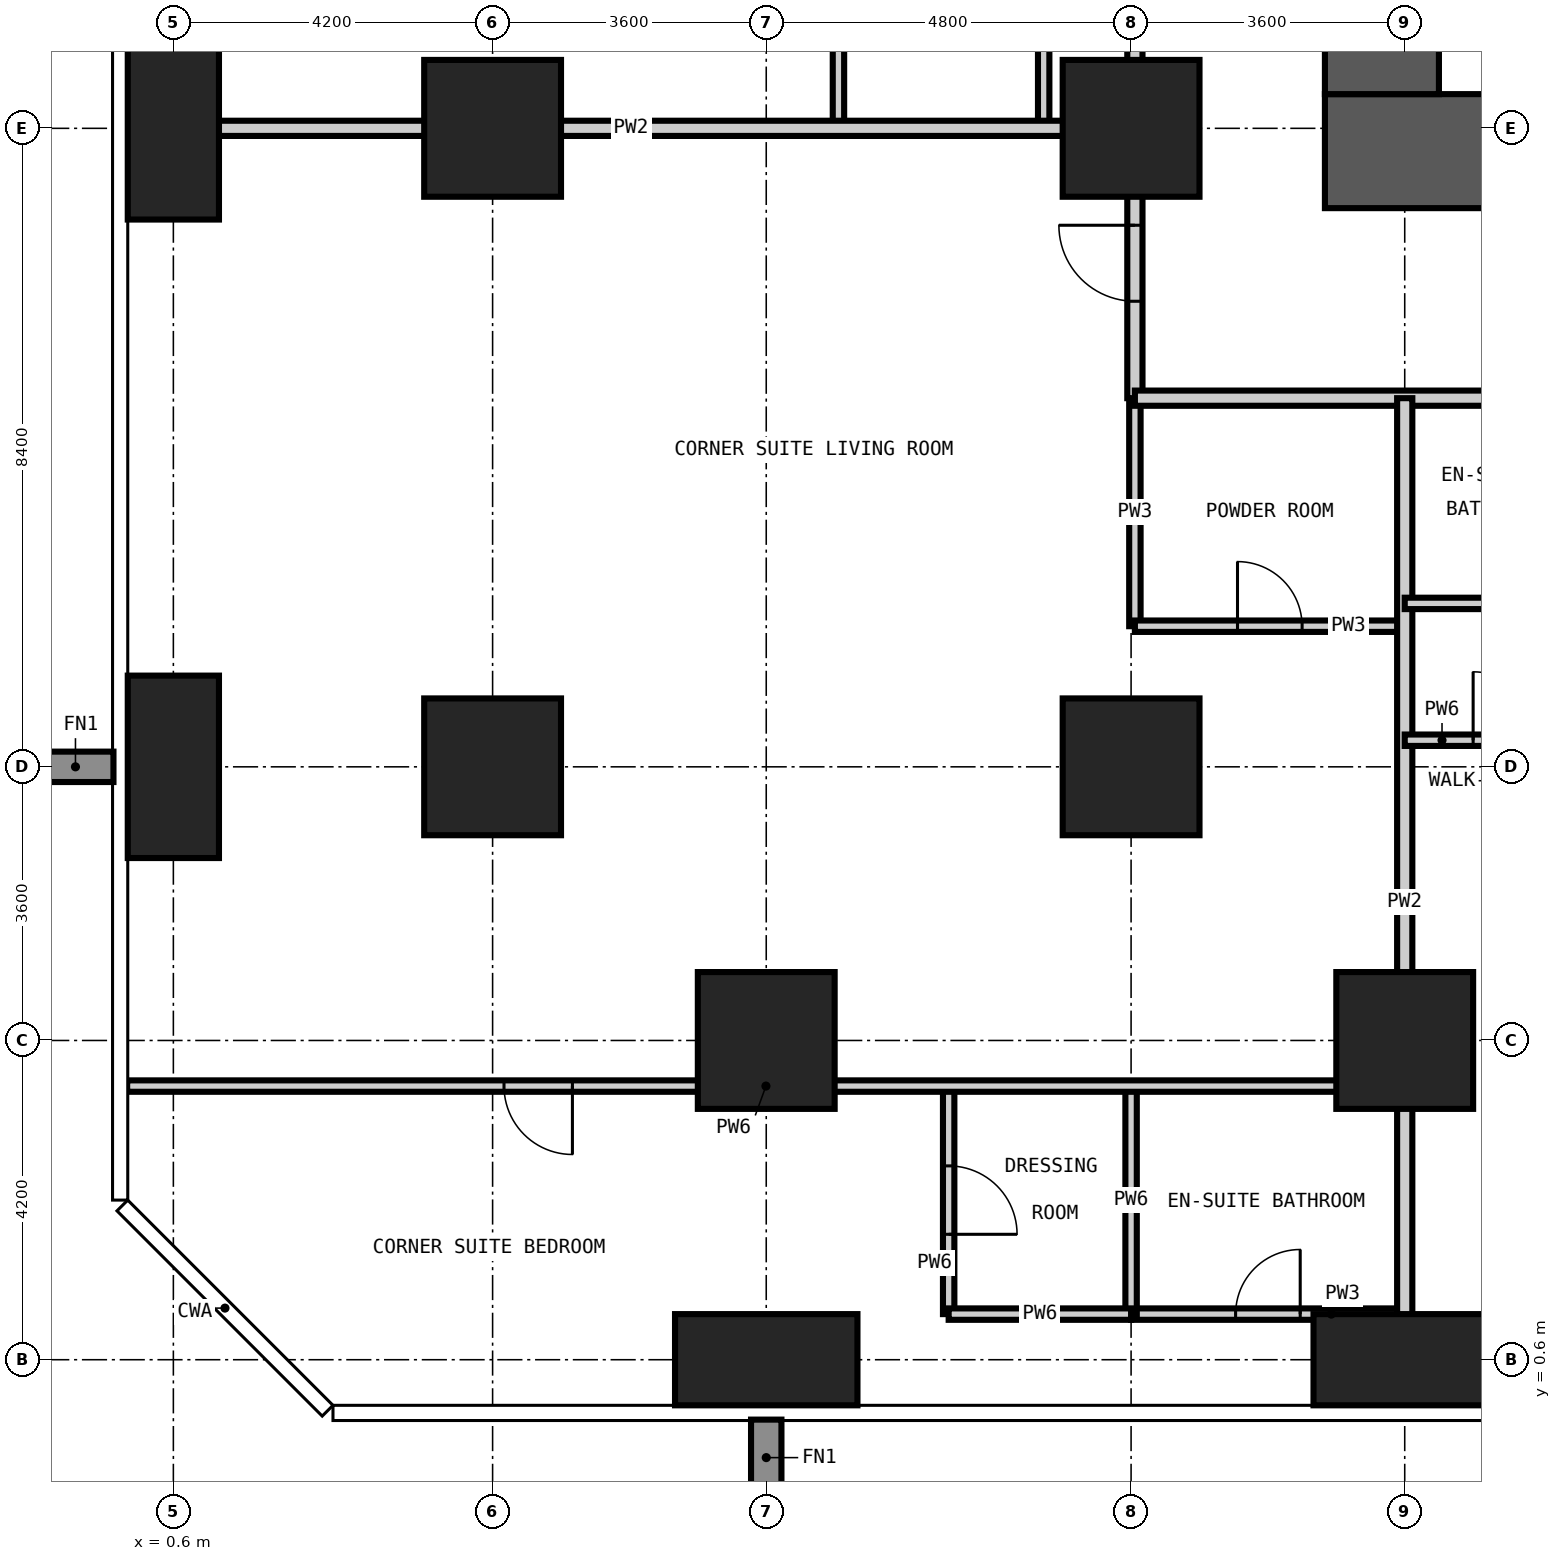
"""IFC4 building model, lengths in metres.
Left out: names, types, materials, properties, quantities, classifications, styles, units other than length and angle.
Written with IfcOpenShell. Run it as: python <this file> out.ifc"""

import sys

from ifc_helpers import new_model, si_unit, direction, frame, frame_2d, origin, origin_2d, place, context, subcontext, project, spatial, rectangle, extrude, element, fill, save


model = new_model("IFC4")
c1 = context("Model", 3, precision=1e-05, world=origin(), true_north=direction((0.0, 1.0)))
c2 = subcontext(c1, "Body", "Model", "MODEL_VIEW")
j1 = project(units=[si_unit("LENGTHUNIT", "METRE"), si_unit("PLANEANGLEUNIT", "RADIAN")], contexts=[c1])
p1 = place(None, origin())
s1 = spatial("IfcSite", under=j1, at=p1, CompositionType="ELEMENT")
p2 = place(p1, origin())
s2 = spatial("IfcBuilding", under=s1, at=p2, CompositionType="ELEMENT")
p3 = place(p2, frame((0.0, 0.0, 63.0)))
s3 = spatial("IfcBuildingStorey", under=s2, at=p3, CompositionType="ELEMENT", Elevation=63.0)
for number, where, z_axis, x_axis in (
    (1, (0.6, 8.4, -0.35), (0.0, 0.0, 1.0), (1.0, 0.0, 0.0)),
    (2, (0.6, 16.8, -0.35), (0.0, 0.0, 1.0), (1.0, 0.0, 0.0)),
):
    element("IfcColumn", number, at=place(p3, frame(where, z_axis=z_axis, x_axis=x_axis)), inside=s3, PredefinedType="COLUMN", context=c2, shape_type="SweptSolid", body=[
        extrude(rectangle(XDim=1.2, YDim=2.4, at=origin_2d()), origin(), (0.0, 0.0, 1.0), 3.6),
    ])
for number, where, z_axis, x_axis in (
    (3, (4.8, 8.4, -0.35), (0.0, 0.0, 1.0), (1.0, 0.0, 0.0)),
    (4, (4.8, 16.8, -0.35), (0.0, 0.0, 1.0), (1.0, 0.0, 0.0)),
):
    element("IfcColumn", number, at=place(p3, frame(where, z_axis=z_axis, x_axis=x_axis)), inside=s3, PredefinedType="COLUMN", context=c2, shape_type="SweptSolid", body=[
        extrude(rectangle(XDim=1.8, YDim=1.8, at=origin_2d()), origin(), (0.0, 0.0, 1.0), 3.6),
    ])
p4 = place(p3, frame((8.4, 0.6, -0.35), z_axis=(0.0, 0.0, 1.0), x_axis=(1.0, 0.0, 0.0)))
e5 = element("IfcColumn", 5, at=p4, inside=s3, PredefinedType="COLUMN", context=c2, shape_type="SweptSolid", body=[
    extrude(rectangle(XDim=2.4, YDim=1.2, at=origin_2d()), origin(), (0.0, 0.0, 1.0), 3.6),
])
for number, where, z_axis, x_axis in (
    (6, (8.4, 4.8, -0.35), (0.0, 0.0, 1.0), (1.0, 0.0, 0.0)),
    (7, (13.2, 8.4, -0.35), (0.0, 0.0, 1.0), (1.0, 0.0, 0.0)),
    (8, (13.2, 16.8, -0.35), (0.0, 0.0, 1.0), (1.0, 0.0, 0.0)),
):
    element("IfcColumn", number, at=place(p3, frame(where, z_axis=z_axis, x_axis=x_axis)), inside=s3, PredefinedType="COLUMN", context=c2, shape_type="SweptSolid", body=[
        extrude(rectangle(XDim=1.8, YDim=1.8, at=origin_2d()), origin(), (0.0, 0.0, 1.0), 3.6),
    ])
p5 = place(p3, frame((16.8, 0.6, -0.35), z_axis=(0.0, 0.0, 1.0), x_axis=(1.0, 0.0, 0.0)))
e9 = element("IfcColumn", 9, at=p5, inside=s3, PredefinedType="COLUMN", context=c2, shape_type="SweptSolid", body=[
    extrude(rectangle(XDim=2.4, YDim=1.2, at=origin_2d()), origin(), (0.0, 0.0, 1.0), 3.6),
])
p6 = place(p3, frame((16.8, 4.8, -0.35), z_axis=(0.0, 0.0, 1.0), x_axis=(1.0, 0.0, 0.0)))
e10 = element("IfcColumn", 10, at=p6, inside=s3, PredefinedType="COLUMN", context=c2, shape_type="SweptSolid", body=[
    extrude(rectangle(XDim=1.8, YDim=1.8, at=origin_2d()), origin(), (0.0, 0.0, 1.0), 3.6),
])
p7 = place(p3, frame((15.75, 16.5, -0.35), z_axis=(0.0, 0.0, 1.0), x_axis=(1.0, 0.0, 0.0)))
e11 = element("IfcWall", 11, at=p7, inside=s3, PredefinedType="SHEAR", context=c2, shape_type="SweptSolid", body=[
    extrude(rectangle(XDim=27.3, YDim=1.5, at=frame_2d((13.65, 0.0))), origin(), (0.0, 0.0, 1.0), 3.6),
])
p8 = place(p7, frame((13.15, 0.0, 0.35)))
e12 = element("IfcOpeningElement", 12, at=p8, cuts=e11, PredefinedType="OPENING", context=c2, shape_type="SweptSolid", body=[
    extrude(rectangle(XDim=1.0, YDim=2.1, at=frame_2d((0.5, 1.05))), frame((0.0, 0.76, 0.0), z_axis=(0.0, -1.0, 0.0), x_axis=(1.0, 0.0, 0.0)), (0.0, 0.0, 1.0), 1.52),
])
p9 = place(p7, frame((19.45, 0.0, 0.35)))
e13 = element("IfcOpeningElement", 13, at=p9, cuts=e11, PredefinedType="OPENING", context=c2, shape_type="SweptSolid", body=[
    extrude(rectangle(XDim=1.0, YDim=2.1, at=frame_2d((0.5, 1.05))), frame((0.0, 0.76, 0.0), z_axis=(0.0, -1.0, 0.0), x_axis=(1.0, 0.0, 0.0)), (0.0, 0.0, 1.0), 1.52),
])
p10 = place(p3, frame((16.5, 41.55, -0.35), z_axis=(0.0, 0.0, 1.0), x_axis=(0.0, -1.0, 0.0)))
e14 = element("IfcWall", 14, at=p10, inside=s3, PredefinedType="SHEAR", context=c2, shape_type="SweptSolid", body=[
    extrude(rectangle(XDim=24.3, YDim=1.5, at=frame_2d((12.15, 0.0))), origin(), (0.0, 0.0, 1.0), 3.6),
])
p11 = place(p10, frame((11.25, 0.0, 0.35)))
e15 = element("IfcOpeningElement", 15, at=p11, cuts=e14, PredefinedType="OPENING", context=c2, shape_type="SweptSolid", body=[
    extrude(rectangle(XDim=1.8, YDim=2.2, at=frame_2d((0.9, 1.1))), frame((0.0, 0.76, 0.0), z_axis=(0.0, -1.0, 0.0), x_axis=(1.0, 0.0, 0.0)), (0.0, 0.0, 1.0), 1.52),
])
p12 = place(p10, frame((20.05, 0.0, 0.35)))
e16 = element("IfcOpeningElement", 16, at=p12, cuts=e14, PredefinedType="OPENING", context=c2, shape_type="SweptSolid", body=[
    extrude(rectangle(XDim=1.0, YDim=2.1, at=frame_2d((0.5, 1.05))), frame((0.0, 0.76, 0.0), z_axis=(0.0, -1.0, 0.0), x_axis=(1.0, 0.0, 0.0)), (0.0, 0.0, 1.0), 1.52),
])
p13 = place(p10, frame((5.35, 0.0, 0.35)))
e17 = element("IfcOpeningElement", 17, at=p13, cuts=e14, PredefinedType="OPENING", context=c2, shape_type="SweptSolid", body=[
    extrude(rectangle(XDim=1.0, YDim=2.1, at=frame_2d((0.5, 1.05))), frame((0.0, 0.76, 0.0), z_axis=(0.0, -1.0, 0.0), x_axis=(1.0, 0.0, 0.0)), (0.0, 0.0, 1.0), 1.52),
])
p14 = place(p3, frame((9.35, 16.8, 0.0), z_axis=(0.0, 0.0, 1.0), x_axis=(0.0, 1.0, 0.0)))
e18 = element("IfcWall", 18, at=p14, inside=s3, PredefinedType="PARTITIONING", context=c2, shape_type="SweptSolid", body=[
    extrude(rectangle(XDim=3.0, YDim=0.15, at=frame_2d((1.5, 0.0))), origin(), (0.0, 0.0, 1.0), 3.25),
])
p15 = place(p3, frame((12.05, 16.8, 0.0), z_axis=(0.0, 0.0, 1.0), x_axis=(0.0, 1.0, 0.0)))
e19 = element("IfcWall", 19, at=p15, inside=s3, PredefinedType="PARTITIONING", context=c2, shape_type="SweptSolid", body=[
    extrude(rectangle(XDim=3.0, YDim=0.15, at=frame_2d((1.5, 0.0))), origin(), (0.0, 0.0, 1.0), 3.25),
])
p16 = place(p15, frame((1.075, 0.0, 0.0)))
e20 = element("IfcOpeningElement", 20, at=p16, cuts=e19, PredefinedType="OPENING", context=c2, shape_type="SweptSolid", body=[
    extrude(rectangle(XDim=0.85, YDim=2.1, at=frame_2d((0.425, 1.05))), frame((0.0, 0.085, 0.0), z_axis=(0.0, -1.0, 0.0), x_axis=(1.0, 0.0, 0.0)), (0.0, 0.0, 1.0), 0.17),
])
p17 = place(p3, frame((13.25, 10.25, 0.0), z_axis=(0.0, 0.0, 1.0), x_axis=(0.0, 1.0, 0.0)))
e21 = element("IfcWall", 21, at=p17, inside=s3, PredefinedType="PARTITIONING", context=c2, shape_type="SweptSolid", body=[
    extrude(rectangle(XDim=3.0, YDim=0.15, at=frame_2d((1.5, 0.0))), origin(), (0.0, 0.0, 1.0), 3.25),
])
p18 = place(p3, frame((13.2, 1.2, 0.0), z_axis=(0.0, 0.0, 1.0), x_axis=(1.0, 0.0, 0.0)))
e22 = element("IfcWall", 22, at=p18, inside=s3, PredefinedType="PARTITIONING", context=c2, shape_type="SweptSolid", body=[
    extrude(rectangle(XDim=3.6, YDim=0.15, at=frame_2d((1.8, 0.0))), origin(), (0.0, 0.0, 1.0), 3.25),
])
p19 = place(p18, frame((1.375, 0.0, 0.0)))
e23 = element("IfcOpeningElement", 23, at=p19, cuts=e22, PredefinedType="OPENING", context=c2, shape_type="SweptSolid", body=[
    extrude(rectangle(XDim=0.85, YDim=2.1, at=frame_2d((0.425, 1.05))), frame((0.0, 0.085, 0.0), z_axis=(0.0, -1.0, 0.0), x_axis=(1.0, 0.0, 0.0)), (0.0, 0.0, 1.0), 0.17),
])
p20 = place(p3, frame((13.25, 10.25, 0.0), z_axis=(0.0, 0.0, 1.0), x_axis=(1.0, 0.0, 0.0)))
e24 = element("IfcWall", 24, at=p20, inside=s3, PredefinedType="PARTITIONING", context=c2, shape_type="SweptSolid", body=[
    extrude(rectangle(XDim=3.55, YDim=0.15, at=frame_2d((1.775, 0.0))), origin(), (0.0, 0.0, 1.0), 3.25),
])
p21 = place(p20, frame((1.35, 0.0, 0.0)))
e25 = element("IfcOpeningElement", 25, at=p21, cuts=e24, PredefinedType="OPENING", context=c2, shape_type="SweptSolid", body=[
    extrude(rectangle(XDim=0.85, YDim=2.1, at=frame_2d((0.425, 1.05))), frame((0.0, 0.085, 0.0), z_axis=(0.0, -1.0, 0.0), x_axis=(1.0, 0.0, 0.0)), (0.0, 0.0, 1.0), 0.17),
])
p22 = place(p3, frame((13.25, 13.25, 0.0), z_axis=(0.0, 0.0, 1.0), x_axis=(0.0, 1.0, 0.0)))
e26 = element("IfcWall", 26, at=p22, inside=s3, PredefinedType="PARTITIONING", context=c2, shape_type="SweptSolid", body=[
    extrude(rectangle(XDim=31.7, YDim=0.2, at=frame_2d((15.85, 0.0))), origin(), (0.0, 0.0, 1.0), 3.25),
])
p23 = place(p22, frame((7.25, 0.0, 0.0)))
e27 = element("IfcOpeningElement", 27, at=p23, cuts=e26, PredefinedType="OPENING", context=c2, shape_type="SweptSolid", body=[
    extrude(rectangle(XDim=1.0, YDim=2.2, at=frame_2d((0.5, 1.1))), frame((0.0, 0.11, 0.0), z_axis=(0.0, -1.0, 0.0), x_axis=(1.0, 0.0, 0.0)), (0.0, 0.0, 1.0), 0.22),
])
p24 = place(p22, frame((15.65, 0.0, 0.0)))
e28 = element("IfcOpeningElement", 28, at=p24, cuts=e26, PredefinedType="OPENING", context=c2, shape_type="SweptSolid", body=[
    extrude(rectangle(XDim=1.0, YDim=2.2, at=frame_2d((0.5, 1.1))), frame((0.0, 0.11, 0.0), z_axis=(0.0, -1.0, 0.0), x_axis=(1.0, 0.0, 0.0)), (0.0, 0.0, 1.0), 0.22),
])
p25 = place(p22, frame((24.05, 0.0, 0.0)))
e29 = element("IfcOpeningElement", 29, at=p25, cuts=e26, PredefinedType="OPENING", context=c2, shape_type="SweptSolid", body=[
    extrude(rectangle(XDim=1.0, YDim=2.2, at=frame_2d((0.5, 1.1))), frame((0.0, 0.11, 0.0), z_axis=(0.0, -1.0, 0.0), x_axis=(1.0, 0.0, 0.0)), (0.0, 0.0, 1.0), 0.22),
])
p26 = place(p22, frame((1.275, 0.0, 0.0)))
e30 = element("IfcOpeningElement", 30, at=p26, cuts=e26, PredefinedType="OPENING", context=c2, shape_type="SweptSolid", body=[
    extrude(rectangle(XDim=1.0, YDim=2.2, at=frame_2d((0.5, 1.1))), frame((0.0, 0.11, 0.0), z_axis=(0.0, -1.0, 0.0), x_axis=(1.0, 0.0, 0.0)), (0.0, 0.0, 1.0), 0.22),
])
p27 = place(p22, frame((29.725, 0.0, 0.0)))
e31 = element("IfcOpeningElement", 31, at=p27, cuts=e26, PredefinedType="OPENING", context=c2, shape_type="SweptSolid", body=[
    extrude(rectangle(XDim=1.0, YDim=2.2, at=frame_2d((0.5, 1.1))), frame((0.0, 0.11, 0.0), z_axis=(0.0, -1.0, 0.0), x_axis=(1.0, 0.0, 0.0)), (0.0, 0.0, 1.0), 0.22),
])
p28 = place(p3, frame((46.15, 13.25, 0.0), z_axis=(0.0, 0.0, 1.0), x_axis=(-1.0, 0.0, 0.0)))
e32 = element("IfcWall", 32, at=p28, inside=s3, PredefinedType="PARTITIONING", context=c2, shape_type="SweptSolid", body=[
    extrude(rectangle(XDim=32.9, YDim=0.2, at=frame_2d((16.45, 0.0))), origin(), (0.0, 0.0, 1.0), 3.25),
])
p29 = place(p28, frame((25.4, 0.0, 0.0)))
e33 = element("IfcOpeningElement", 33, at=p29, cuts=e32, PredefinedType="OPENING", context=c2, shape_type="SweptSolid", body=[
    extrude(rectangle(XDim=1.0, YDim=2.2, at=frame_2d((0.5, 1.1))), frame((0.0, 0.11, 0.0), z_axis=(0.0, -1.0, 0.0), x_axis=(1.0, 0.0, 0.0)), (0.0, 0.0, 1.0), 0.22),
])
p30 = place(p28, frame((20.45, 0.0, 0.0)))
e34 = element("IfcOpeningElement", 34, at=p30, cuts=e32, PredefinedType="OPENING", context=c2, shape_type="SweptSolid", body=[
    extrude(rectangle(XDim=1.0, YDim=2.2, at=frame_2d((0.5, 1.1))), frame((0.0, 0.11, 0.0), z_axis=(0.0, -1.0, 0.0), x_axis=(1.0, 0.0, 0.0)), (0.0, 0.0, 1.0), 0.22),
])
p31 = place(p28, frame((12.05, 0.0, 0.0)))
e35 = element("IfcOpeningElement", 35, at=p31, cuts=e32, PredefinedType="OPENING", context=c2, shape_type="SweptSolid", body=[
    extrude(rectangle(XDim=1.0, YDim=2.2, at=frame_2d((0.5, 1.1))), frame((0.0, 0.11, 0.0), z_axis=(0.0, -1.0, 0.0), x_axis=(1.0, 0.0, 0.0)), (0.0, 0.0, 1.0), 0.22),
])
p32 = place(p28, frame((7.1, 0.0, 0.0)))
e36 = element("IfcOpeningElement", 36, at=p32, cuts=e32, PredefinedType="OPENING", context=c2, shape_type="SweptSolid", body=[
    extrude(rectangle(XDim=1.0, YDim=2.2, at=frame_2d((0.5, 1.1))), frame((0.0, 0.11, 0.0), z_axis=(0.0, -1.0, 0.0), x_axis=(1.0, 0.0, 0.0)), (0.0, 0.0, 1.0), 0.22),
])
for number, where, z_axis, x_axis in (
    (37, (16.8, -0.008, 0.0), (0.0, 0.0, 1.0), (0.0, 1.0, 0.0)),
    (38, (-0.008, 16.8, 0.0), (0.0, 0.0, 1.0), (1.0, 0.0, 0.0)),
):
    element("IfcWall", number, at=place(p3, frame(where, z_axis=z_axis, x_axis=x_axis)), inside=s3, PredefinedType="PARTITIONING", context=c2, shape_type="SweptSolid", body=[
        extrude(rectangle(XDim=13.258, YDim=0.2, at=frame_2d((6.629, 0.0))), origin(), (0.0, 0.0, 1.0), 3.25),
    ])
p33 = place(p3, frame((10.8, 1.2, 0.0), z_axis=(0.0, 0.0, 1.0), x_axis=(0.0, 1.0, 0.0)))
e39 = element("IfcWall", 39, at=p33, inside=s3, PredefinedType="PARTITIONING", context=c2, shape_type="SweptSolid", body=[
    extrude(rectangle(XDim=3.0, YDim=0.15, at=frame_2d((1.5, 0.0))), origin(), (0.0, 0.0, 1.0), 3.25),
])
p34 = place(p33, frame((1.05, 0.0, 0.0)))
e40 = element("IfcOpeningElement", 40, at=p34, cuts=e39, PredefinedType="OPENING", context=c2, shape_type="SweptSolid", body=[
    extrude(rectangle(XDim=0.9, YDim=2.1, at=frame_2d((0.45, 1.05))), frame((0.0, 0.085, 0.0), z_axis=(0.0, -1.0, 0.0), x_axis=(1.0, 0.0, 0.0)), (0.0, 0.0, 1.0), 0.17),
])
p35 = place(p3, frame((13.2, 1.2, 0.0), z_axis=(0.0, 0.0, 1.0), x_axis=(0.0, 1.0, 0.0)))
e41 = element("IfcWall", 41, at=p35, inside=s3, PredefinedType="PARTITIONING", context=c2, shape_type="SweptSolid", body=[
    extrude(rectangle(XDim=3.0, YDim=0.15, at=frame_2d((1.5, 0.0))), origin(), (0.0, 0.0, 1.0), 3.25),
])
p36 = place(p3, frame((10.8, 1.2, 0.0), z_axis=(0.0, 0.0, 1.0), x_axis=(1.0, 0.0, 0.0)))
e42 = element("IfcWall", 42, at=p36, inside=s3, PredefinedType="PARTITIONING", context=c2, shape_type="SweptSolid", body=[
    extrude(rectangle(XDim=2.4, YDim=0.15, at=frame_2d((1.2, 0.0))), origin(), (0.0, 0.0, 1.0), 3.25),
])
p37 = place(p3, frame((-0.008, 4.2, 0.0), z_axis=(0.0, 0.0, 1.0), x_axis=(1.0, 0.0, 0.0)))
e43 = element("IfcWall", 43, at=p37, inside=s3, PredefinedType="PARTITIONING", context=c2, shape_type="SweptSolid", body=[
    extrude(rectangle(XDim=16.808, YDim=0.15, at=frame_2d((8.404, 0.0))), origin(), (0.0, 0.0, 1.0), 3.25),
])
p38 = place(p37, frame((4.958, 0.0, 0.0)))
e44 = element("IfcOpeningElement", 44, at=p38, cuts=e43, PredefinedType="OPENING", context=c2, shape_type="SweptSolid", body=[
    extrude(rectangle(XDim=0.9, YDim=2.1, at=frame_2d((0.45, 1.05))), frame((0.0, 0.085, 0.0), z_axis=(0.0, -1.0, 0.0), x_axis=(1.0, 0.0, 0.0)), (0.0, 0.0, 1.0), 0.17),
])
p39 = place(p3, frame((16.8, 8.75, 0.0), z_axis=(0.0, 0.0, 1.0), x_axis=(1.0, 0.0, 0.0)))
e45 = element("IfcWall", 45, at=p39, inside=s3, PredefinedType="PARTITIONING", context=c2, shape_type="SweptSolid", body=[
    extrude(rectangle(XDim=2.7, YDim=0.15, at=frame_2d((1.35, 0.0))), origin(), (0.0, 0.0, 1.0), 3.25),
])
p40 = place(p39, frame((0.9, 0.0, 0.0)))
e46 = element("IfcOpeningElement", 46, at=p40, cuts=e45, PredefinedType="OPENING", context=c2, shape_type="SweptSolid", body=[
    extrude(rectangle(XDim=0.9, YDim=2.1, at=frame_2d((0.45, 1.05))), frame((0.0, 0.085, 0.0), z_axis=(0.0, -1.0, 0.0), x_axis=(1.0, 0.0, 0.0)), (0.0, 0.0, 1.0), 0.17),
])
p41 = place(p3, frame((16.8, 10.55, 0.0), z_axis=(0.0, 0.0, 1.0), x_axis=(1.0, 0.0, 0.0)))
e47 = element("IfcWall", 47, at=p41, inside=s3, PredefinedType="PARTITIONING", context=c2, shape_type="SweptSolid", body=[
    extrude(rectangle(XDim=2.7, YDim=0.15, at=frame_2d((1.35, 0.0))), origin(), (0.0, 0.0, 1.0), 3.25),
])
p42 = place(p40, origin())
e48 = element("IfcDoor", 48, at=p42, inside=s3, OperationType="SINGLE_SWING_LEFT", PredefinedType="DOOR", context=c2, shape_type="SweptSolid", body=[
    extrude(rectangle(XDim=0.9, YDim=2.1, at=frame_2d((0.45, 1.05))), frame((0.0, 0.025, 0.0), z_axis=(0.0, -1.0, 0.0), x_axis=(1.0, 0.0, 0.0)), (0.0, 0.0, 1.0), 0.05),
])
fill(e46, e48)
p43 = place(p26, origin())
e49 = element("IfcDoor", 49, at=p43, inside=s3, OperationType="SINGLE_SWING_RIGHT", PredefinedType="DOOR", context=c2, shape_type="SweptSolid", body=[
    extrude(rectangle(XDim=1.0, YDim=2.2, at=frame_2d((0.5, 1.1))), frame((0.0, 0.025, 0.0), z_axis=(0.0, -1.0, 0.0), x_axis=(1.0, 0.0, 0.0)), (0.0, 0.0, 1.0), 0.05),
])
fill(e30, e49)
p44 = place(p21, origin())
e50 = element("IfcDoor", 50, at=p44, inside=s3, OperationType="SINGLE_SWING_LEFT", PredefinedType="DOOR", context=c2, shape_type="SweptSolid", body=[
    extrude(rectangle(XDim=0.85, YDim=2.1, at=frame_2d((0.425, 1.05))), frame((0.0, 0.025, 0.0), z_axis=(0.0, -1.0, 0.0), x_axis=(1.0, 0.0, 0.0)), (0.0, 0.0, 1.0), 0.05),
])
fill(e25, e50)
p45 = place(p38, frame((0.9, 0.0, 0.0), z_axis=(0.0, 0.0, 1.0), x_axis=(-1.0, 0.0, 0.0)))
e51 = element("IfcDoor", 51, at=p45, inside=s3, OperationType="SINGLE_SWING_LEFT", PredefinedType="DOOR", context=c2, shape_type="SweptSolid", body=[
    extrude(rectangle(XDim=0.9, YDim=2.1, at=frame_2d((0.45, 1.05))), frame((0.0, 0.025, 0.0), z_axis=(0.0, -1.0, 0.0), x_axis=(1.0, 0.0, 0.0)), (0.0, 0.0, 1.0), 0.05),
])
fill(e44, e51)
p46 = place(p19, origin())
e52 = element("IfcDoor", 52, at=p46, inside=s3, OperationType="SINGLE_SWING_RIGHT", PredefinedType="DOOR", context=c2, shape_type="SweptSolid", body=[
    extrude(rectangle(XDim=0.85, YDim=2.1, at=frame_2d((0.425, 1.05))), frame((0.0, 0.025, 0.0), z_axis=(0.0, -1.0, 0.0), x_axis=(1.0, 0.0, 0.0)), (0.0, 0.0, 1.0), 0.05),
])
fill(e23, e52)
p47 = place(p34, frame((0.9, 0.0, 0.0), z_axis=(0.0, 0.0, 1.0), x_axis=(-1.0, 0.0, 0.0)))
e53 = element("IfcDoor", 53, at=p47, inside=s3, OperationType="SINGLE_SWING_RIGHT", PredefinedType="DOOR", context=c2, shape_type="SweptSolid", body=[
    extrude(rectangle(XDim=0.9, YDim=2.1, at=frame_2d((0.45, 1.05))), frame((0.0, 0.025, 0.0), z_axis=(0.0, -1.0, 0.0), x_axis=(1.0, 0.0, 0.0)), (0.0, 0.0, 1.0), 0.05),
])
fill(e40, e53)
save(model, sys.argv[1])
